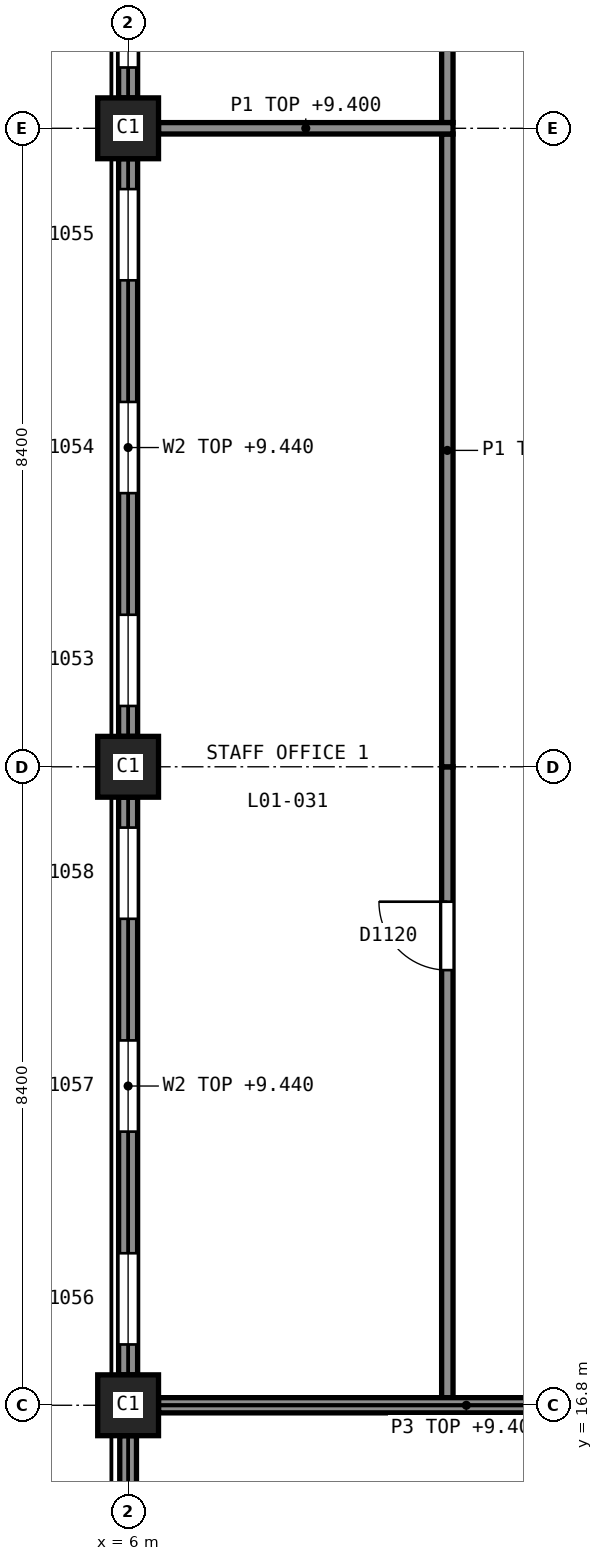
"""IFC4 building model, lengths in metres.
Left out: names, types, materials, properties, quantities, classifications, styles, units other than length and angle.
Written with IfcOpenShell. Run it as: python <this file> out.ifc"""

import sys

from ifc_helpers import new_model, si_unit, direction, frame, frame_2d, origin, origin_2d, place, context, subcontext, project, spatial, rectangle, extrude, element, fill, save


model = new_model("IFC4")
c1 = context("Model", 3, precision=1e-05, world=origin(), true_north=direction((0.0, 1.0)))
c2 = subcontext(c1, "Body", "Model", "MODEL_VIEW")
j1 = project(units=[si_unit("LENGTHUNIT", "METRE"), si_unit("PLANEANGLEUNIT", "RADIAN")], contexts=[c1])
p1 = place(None, origin())
s1 = spatial("IfcSite", under=j1, at=p1, CompositionType="ELEMENT")
p2 = place(p1, origin())
s2 = spatial("IfcBuilding", under=s1, at=p2, CompositionType="ELEMENT")
p3 = place(p2, frame((0.0, 0.0, 5.5)))
s3 = spatial("IfcBuildingStorey", under=s2, at=p3, CompositionType="ELEMENT", Elevation=5.5)
for number, where, z_axis, x_axis in (
    (1, (6.0, 16.8, 0.0), (0.0, 0.0, 1.0), (1.0, 0.0, 0.0)),
    (2, (6.0, 25.2, 0.0), (0.0, 0.0, 1.0), (1.0, 0.0, 0.0)),
    (3, (6.0, 33.6, 0.0), (0.0, 0.0, 1.0), (1.0, 0.0, 0.0)),
):
    element("IfcColumn", number, at=place(p3, frame(where, z_axis=z_axis, x_axis=x_axis)), inside=s3, PredefinedType="COLUMN", context=c2, shape_type="SweptSolid", body=[
        extrude(rectangle(XDim=0.8, YDim=0.8, at=origin_2d()), origin(), (0.0, 0.0, 1.0), 5.0),
    ])
p4 = place(p3, frame((6.0, 34.0, 0.0), z_axis=(0.0, 0.0, 1.0), x_axis=(0.0, 1.0, 0.0)))
e4 = element("IfcWall", 4, at=p4, inside=s3, PredefinedType="SOLIDWALL", context=c2, shape_type="SweptSolid", body=[
    extrude(rectangle(XDim=7.6, YDim=0.25, at=frame_2d((3.8, 0.0))), origin(), (0.0, 0.0, 1.0), 3.94),
])
p5 = place(p4, frame((0.4, 0.0, 0.9)))
e5 = element("IfcOpeningElement", 5, at=p5, cuts=e4, PredefinedType="OPENING", context=c2, shape_type="SweptSolid", body=[
    extrude(rectangle(XDim=1.2, YDim=2.1, at=frame_2d((0.6, 1.05))), frame((0.0, 0.135, 0.0), z_axis=(0.0, -1.0, 0.0), x_axis=(1.0, 0.0, 0.0)), (0.0, 0.0, 1.0), 0.27),
])
p6 = place(p4, frame((3.2, 0.0, 0.9)))
e6 = element("IfcOpeningElement", 6, at=p6, cuts=e4, PredefinedType="OPENING", context=c2, shape_type="SweptSolid", body=[
    extrude(rectangle(XDim=1.2, YDim=2.1, at=frame_2d((0.6, 1.05))), frame((0.0, 0.135, 0.0), z_axis=(0.0, -1.0, 0.0), x_axis=(1.0, 0.0, 0.0)), (0.0, 0.0, 1.0), 0.27),
])
p7 = place(p4, frame((6.0, 0.0, 0.9)))
e7 = element("IfcOpeningElement", 7, at=p7, cuts=e4, PredefinedType="OPENING", context=c2, shape_type="SweptSolid", body=[
    extrude(rectangle(XDim=1.2, YDim=2.1, at=frame_2d((0.6, 1.05))), frame((0.0, 0.135, 0.0), z_axis=(0.0, -1.0, 0.0), x_axis=(1.0, 0.0, 0.0)), (0.0, 0.0, 1.0), 0.27),
])
p8 = place(p3, frame((6.0, 25.6, 0.0), z_axis=(0.0, 0.0, 1.0), x_axis=(0.0, 1.0, 0.0)))
e8 = element("IfcWall", 8, at=p8, inside=s3, PredefinedType="SOLIDWALL", context=c2, shape_type="SweptSolid", body=[
    extrude(rectangle(XDim=7.6, YDim=0.25, at=frame_2d((3.8, 0.0))), origin(), (0.0, 0.0, 1.0), 3.94),
])
p9 = place(p8, frame((0.4, 0.0, 0.9)))
e9 = element("IfcOpeningElement", 9, at=p9, cuts=e8, PredefinedType="OPENING", context=c2, shape_type="SweptSolid", body=[
    extrude(rectangle(XDim=1.2, YDim=2.1, at=frame_2d((0.6, 1.05))), frame((0.0, 0.135, 0.0), z_axis=(0.0, -1.0, 0.0), x_axis=(1.0, 0.0, 0.0)), (0.0, 0.0, 1.0), 0.27),
])
p10 = place(p8, frame((3.2, 0.0, 0.9)))
e10 = element("IfcOpeningElement", 10, at=p10, cuts=e8, PredefinedType="OPENING", context=c2, shape_type="SweptSolid", body=[
    extrude(rectangle(XDim=1.2, YDim=2.1, at=frame_2d((0.6, 1.05))), frame((0.0, 0.135, 0.0), z_axis=(0.0, -1.0, 0.0), x_axis=(1.0, 0.0, 0.0)), (0.0, 0.0, 1.0), 0.27),
])
p11 = place(p8, frame((6.0, 0.0, 0.9)))
e11 = element("IfcOpeningElement", 11, at=p11, cuts=e8, PredefinedType="OPENING", context=c2, shape_type="SweptSolid", body=[
    extrude(rectangle(XDim=1.2, YDim=2.1, at=frame_2d((0.6, 1.05))), frame((0.0, 0.135, 0.0), z_axis=(0.0, -1.0, 0.0), x_axis=(1.0, 0.0, 0.0)), (0.0, 0.0, 1.0), 0.27),
])
p12 = place(p3, frame((6.0, 17.2, 0.0), z_axis=(0.0, 0.0, 1.0), x_axis=(0.0, 1.0, 0.0)))
e12 = element("IfcWall", 12, at=p12, inside=s3, PredefinedType="SOLIDWALL", context=c2, shape_type="SweptSolid", body=[
    extrude(rectangle(XDim=7.6, YDim=0.25, at=frame_2d((3.8, 0.0))), origin(), (0.0, 0.0, 1.0), 3.94),
])
p13 = place(p12, frame((0.4, 0.0, 0.9)))
e13 = element("IfcOpeningElement", 13, at=p13, cuts=e12, PredefinedType="OPENING", context=c2, shape_type="SweptSolid", body=[
    extrude(rectangle(XDim=1.2, YDim=2.1, at=frame_2d((0.6, 1.05))), frame((0.0, 0.135, 0.0), z_axis=(0.0, -1.0, 0.0), x_axis=(1.0, 0.0, 0.0)), (0.0, 0.0, 1.0), 0.27),
])
p14 = place(p12, frame((3.2, 0.0, 0.9)))
e14 = element("IfcOpeningElement", 14, at=p14, cuts=e12, PredefinedType="OPENING", context=c2, shape_type="SweptSolid", body=[
    extrude(rectangle(XDim=1.2, YDim=2.1, at=frame_2d((0.6, 1.05))), frame((0.0, 0.135, 0.0), z_axis=(0.0, -1.0, 0.0), x_axis=(1.0, 0.0, 0.0)), (0.0, 0.0, 1.0), 0.27),
])
p15 = place(p12, frame((6.0, 0.0, 0.9)))
e15 = element("IfcOpeningElement", 15, at=p15, cuts=e12, PredefinedType="OPENING", context=c2, shape_type="SweptSolid", body=[
    extrude(rectangle(XDim=1.2, YDim=2.1, at=frame_2d((0.6, 1.05))), frame((0.0, 0.135, 0.0), z_axis=(0.0, -1.0, 0.0), x_axis=(1.0, 0.0, 0.0)), (0.0, 0.0, 1.0), 0.27),
])
p16 = place(p3, frame((6.0, 8.4, 0.0), z_axis=(0.0, 0.0, 1.0), x_axis=(0.0, 1.0, 0.0)))
e16 = element("IfcWall", 16, at=p16, inside=s3, PredefinedType="SOLIDWALL", context=c2, shape_type="SweptSolid", body=[
    extrude(rectangle(XDim=8.0, YDim=0.22, at=frame_2d((4.0, 0.0))), origin(), (0.0, 0.0, 1.0), 3.94),
])
p17 = place(p16, frame((0.45, 0.0, 0.9)))
e17 = element("IfcOpeningElement", 17, at=p17, cuts=e16, PredefinedType="OPENING", context=c2, shape_type="SweptSolid", body=[
    extrude(rectangle(XDim=3.6, YDim=1.5, at=frame_2d((1.8, 0.75))), frame((0.0, 0.12, 0.0), z_axis=(0.0, -1.0, 0.0), x_axis=(1.0, 0.0, 0.0)), (0.0, 0.0, 1.0), 0.24),
])
p18 = place(p3, frame((10.2, 33.675, 0.0), z_axis=(0.0, 0.0, 1.0), x_axis=(0.0, 1.0, 0.0)))
e18 = element("IfcWall", 18, at=p18, inside=s3, PredefinedType="PARTITIONING", context=c2, shape_type="SweptSolid", body=[
    extrude(rectangle(XDim=8.325, YDim=0.15, at=frame_2d((4.163, 0.0))), origin(), (0.0, 0.0, 1.0), 3.9),
])
p19 = place(p18, frame((5.65, 0.0, 0.0)))
e19 = element("IfcOpeningElement", 19, at=p19, cuts=e18, PredefinedType="OPENING", context=c2, shape_type="SweptSolid", body=[
    extrude(rectangle(XDim=0.9, YDim=2.1, at=frame_2d((0.45, 1.05))), frame((0.0, 0.085, 0.0), z_axis=(0.0, -1.0, 0.0), x_axis=(1.0, 0.0, 0.0)), (0.0, 0.0, 1.0), 0.17),
])
p20 = place(p3, frame((10.2, 16.9, 0.0), z_axis=(0.0, 0.0, 1.0), x_axis=(0.0, 1.0, 0.0)))
e20 = element("IfcWall", 20, at=p20, inside=s3, PredefinedType="PARTITIONING", context=c2, shape_type="SweptSolid", body=[
    extrude(rectangle(XDim=8.3, YDim=0.15, at=frame_2d((4.15, 0.0))), origin(), (0.0, 0.0, 1.0), 3.9),
])
p21 = place(p20, frame((5.625, 0.0, 0.0)))
e21 = element("IfcOpeningElement", 21, at=p21, cuts=e20, PredefinedType="OPENING", context=c2, shape_type="SweptSolid", body=[
    extrude(rectangle(XDim=0.9, YDim=2.1, at=frame_2d((0.45, 1.05))), frame((0.0, 0.085, 0.0), z_axis=(0.0, -1.0, 0.0), x_axis=(1.0, 0.0, 0.0)), (0.0, 0.0, 1.0), 0.17),
])
p22 = place(p3, frame((10.2, 25.2, 0.0), z_axis=(0.0, 0.0, 1.0), x_axis=(0.0, 1.0, 0.0)))
e22 = element("IfcWall", 22, at=p22, inside=s3, PredefinedType="PARTITIONING", context=c2, shape_type="SweptSolid", body=[
    extrude(rectangle(XDim=8.325, YDim=0.15, at=frame_2d((4.163, 0.0))), origin(), (0.0, 0.0, 1.0), 3.9),
])
p23 = place(p3, frame((6.4, 33.6, 0.0), z_axis=(0.0, 0.0, 1.0), x_axis=(1.0, 0.0, 0.0)))
e23 = element("IfcWall", 23, at=p23, inside=s3, PredefinedType="PARTITIONING", context=c2, shape_type="SweptSolid", body=[
    extrude(rectangle(XDim=3.875, YDim=0.15, at=frame_2d((1.938, 0.0))), origin(), (0.0, 0.0, 1.0), 3.9),
])
p24 = place(p3, frame((6.4, 16.8, 0.0), z_axis=(0.0, 0.0, 1.0), x_axis=(1.0, 0.0, 0.0)))
e24 = element("IfcWall", 24, at=p24, inside=s3, PredefinedType="PARTITIONING", context=c2, shape_type="SweptSolid", body=[
    extrude(rectangle(XDim=8.1, YDim=0.2, at=frame_2d((4.05, 0.0))), origin(), (0.0, 0.0, 1.0), 3.9),
])
p25 = place(p24, frame((5.387, 0.0, 0.0)))
e25 = element("IfcOpeningElement", 25, at=p25, cuts=e24, PredefinedType="OPENING", context=c2, shape_type="SweptSolid", body=[
    extrude(rectangle(XDim=1.0, YDim=2.1, at=frame_2d((0.5, 1.05))), frame((0.0, 0.11, 0.0), z_axis=(0.0, -1.0, 0.0), x_axis=(1.0, 0.0, 0.0)), (0.0, 0.0, 1.0), 0.22),
])
p26 = place(p5, origin())
e26 = element("IfcWindow", 26, at=p26, inside=s3, PartitioningType="SINGLE_PANEL", PredefinedType="WINDOW", context=c2, shape_type="SweptSolid", body=[
    extrude(rectangle(XDim=1.2, YDim=2.1, at=frame_2d((0.6, 1.05))), frame((0.0, -0.045, 0.0), z_axis=(0.0, -1.0, 0.0), x_axis=(1.0, 0.0, 0.0)), (0.0, 0.0, 1.0), 0.06),
])
fill(e5, e26)
p27 = place(p9, origin())
e27 = element("IfcWindow", 27, at=p27, inside=s3, PartitioningType="SINGLE_PANEL", PredefinedType="WINDOW", context=c2, shape_type="SweptSolid", body=[
    extrude(rectangle(XDim=1.2, YDim=2.1, at=frame_2d((0.6, 1.05))), frame((0.0, -0.045, 0.0), z_axis=(0.0, -1.0, 0.0), x_axis=(1.0, 0.0, 0.0)), (0.0, 0.0, 1.0), 0.06),
])
fill(e9, e27)
p28 = place(p10, origin())
e28 = element("IfcWindow", 28, at=p28, inside=s3, PartitioningType="SINGLE_PANEL", PredefinedType="WINDOW", context=c2, shape_type="SweptSolid", body=[
    extrude(rectangle(XDim=1.2, YDim=2.1, at=frame_2d((0.6, 1.05))), frame((0.0, -0.045, 0.0), z_axis=(0.0, -1.0, 0.0), x_axis=(1.0, 0.0, 0.0)), (0.0, 0.0, 1.0), 0.06),
])
fill(e10, e28)
p29 = place(p11, origin())
e29 = element("IfcWindow", 29, at=p29, inside=s3, PartitioningType="SINGLE_PANEL", PredefinedType="WINDOW", context=c2, shape_type="SweptSolid", body=[
    extrude(rectangle(XDim=1.2, YDim=2.1, at=frame_2d((0.6, 1.05))), frame((0.0, -0.045, 0.0), z_axis=(0.0, -1.0, 0.0), x_axis=(1.0, 0.0, 0.0)), (0.0, 0.0, 1.0), 0.06),
])
fill(e11, e29)
p30 = place(p13, origin())
e30 = element("IfcWindow", 30, at=p30, inside=s3, PartitioningType="SINGLE_PANEL", PredefinedType="WINDOW", context=c2, shape_type="SweptSolid", body=[
    extrude(rectangle(XDim=1.2, YDim=2.1, at=frame_2d((0.6, 1.05))), frame((0.0, -0.045, 0.0), z_axis=(0.0, -1.0, 0.0), x_axis=(1.0, 0.0, 0.0)), (0.0, 0.0, 1.0), 0.06),
])
fill(e13, e30)
p31 = place(p14, origin())
e31 = element("IfcWindow", 31, at=p31, inside=s3, PartitioningType="SINGLE_PANEL", PredefinedType="WINDOW", context=c2, shape_type="SweptSolid", body=[
    extrude(rectangle(XDim=1.2, YDim=2.1, at=frame_2d((0.6, 1.05))), frame((0.0, -0.045, 0.0), z_axis=(0.0, -1.0, 0.0), x_axis=(1.0, 0.0, 0.0)), (0.0, 0.0, 1.0), 0.06),
])
fill(e14, e31)
p32 = place(p15, origin())
e32 = element("IfcWindow", 32, at=p32, inside=s3, PartitioningType="SINGLE_PANEL", PredefinedType="WINDOW", context=c2, shape_type="SweptSolid", body=[
    extrude(rectangle(XDim=1.2, YDim=2.1, at=frame_2d((0.6, 1.05))), frame((0.0, -0.045, 0.0), z_axis=(0.0, -1.0, 0.0), x_axis=(1.0, 0.0, 0.0)), (0.0, 0.0, 1.0), 0.06),
])
fill(e15, e32)
p33 = place(p21, origin())
e33 = element("IfcDoor", 33, at=p33, inside=s3, OperationType="SINGLE_SWING_LEFT", PredefinedType="DOOR", context=c2, shape_type="SweptSolid", body=[
    extrude(rectangle(XDim=0.9, YDim=2.1, at=frame_2d((0.45, 1.05))), frame((0.0, 0.025, 0.0), z_axis=(0.0, -1.0, 0.0), x_axis=(1.0, 0.0, 0.0)), (0.0, 0.0, 1.0), 0.05),
])
fill(e21, e33)
save(model, sys.argv[1])
